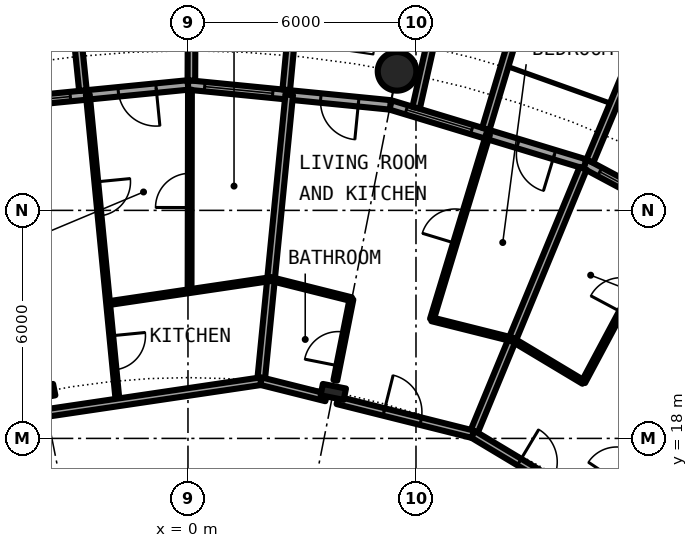
"""IFC4 building model, lengths in metres.
Left out: names, types, materials, properties, quantities, classifications, styles, units other than length and angle.
Written with IfcOpenShell. Run it as: python <this file> out.ifc"""

import sys

from ifc_helpers import new_model, si_unit, direction, frame, frame_2d, origin, origin_2d, place, context, subcontext, project, spatial, rectangle, hollow_circle, i_section, extrude, element, fill, save


model = new_model("IFC4")
c1 = context("Model", 3, precision=1e-05, world=origin(), true_north=direction((0.0, 1.0)))
c2 = subcontext(c1, "Body", "Model", "MODEL_VIEW")
j1 = project(units=[si_unit("LENGTHUNIT", "METRE"), si_unit("PLANEANGLEUNIT", "RADIAN")], contexts=[c1])
p1 = place(None, origin())
s1 = spatial("IfcSite", under=j1, at=p1, CompositionType="ELEMENT")
p2 = place(p1, origin())
s2 = spatial("IfcBuilding", under=s1, at=p2, CompositionType="ELEMENT")
p3 = place(p2, frame((0.0, 0.0, 31.95)))
s3 = spatial("IfcBuildingStorey", under=s2, at=p3, CompositionType="ELEMENT", Elevation=31.95)
p4 = place(p3, frame((5.501, 27.658, 0.0), z_axis=(0.0, 0.0, 1.0), x_axis=(1.0, 0.0, 0.0)))
e1 = element("IfcColumn", 1, at=p4, inside=s3, PredefinedType="COLUMN", context=c2, shape_type="SweptSolid", body=[
    extrude(hollow_circle(Radius=0.508, WallThickness=0.05, at=origin_2d()), origin(), (0.0, 0.0, 1.0), 3.05),
])
for number, where, z_axis, x_axis in (
    (2, (3.824, 19.223, 0.0), (0.0, 0.0, 1.0), (0.195, 0.981, 0.0)),
    (3, (-3.824, 19.223, 0.0), (0.0, 0.0, 1.0), (-0.195, 0.981, 0.0)),
):
    element("IfcColumn", number, at=place(p3, frame(where, z_axis=z_axis, x_axis=x_axis)), inside=s3, PredefinedType="COLUMN", context=c2, shape_type="SweptSolid", body=[
        extrude(i_section(OverallWidth=0.305, OverallDepth=0.62, WebThickness=0.021, FlangeThickness=0.04, FilletRadius=0.027, at=origin_2d()), origin(), (0.0, 0.0, 1.0), 3.05),
    ])
p5 = place(p3, frame((15.167, 22.699, 0.0), z_axis=(0.0, 0.0, 1.0), x_axis=(-0.881915646801, 0.471407246368, 0.0)))
e4 = element("IfcWall", 4, at=p5, inside=s3, PredefinedType="SOLIDWALL", context=c2, shape_type="SweptSolid", body=[
    extrude(rectangle(XDim=5.352, YDim=0.25, at=frame_2d((2.676, 0.0))), origin(), (0.0, 0.0, 1.0), 2.7),
])
p6 = place(p5, frame((0.841, 0.0, 0.0)))
e5 = element("IfcOpeningElement", 5, at=p6, cuts=e4, PredefinedType="OPENING", context=c2, shape_type="SweptSolid", body=[
    extrude(rectangle(XDim=1.0, YDim=2.2, at=frame_2d((0.5, 1.1))), frame((0.0, 0.135, 0.0), z_axis=(0.0, -1.0, 0.0), x_axis=(1.0, 0.0, 0.0)), (0.0, 0.0, 1.0), 0.27),
])
p7 = place(p5, frame((3.111, 0.0, 0.3)))
e6 = element("IfcOpeningElement", 6, at=p7, cuts=e4, PredefinedType="OPENING", context=c2, shape_type="SweptSolid", body=[
    extrude(rectangle(XDim=1.8, YDim=2.1, at=frame_2d((0.9, 1.05))), frame((0.0, 0.135, 0.0), z_axis=(0.0, -1.0, 0.0), x_axis=(1.0, 0.0, 0.0)), (0.0, 0.0, 1.0), 0.27),
])
p8 = place(p3, frame((10.575, 25.295, -0.03), z_axis=(0.0, 0.0, 1.0), x_axis=(0.385697364644, 0.922625353492, 0.0)))
e7 = element("IfcWall", 7, at=p8, inside=s3, PredefinedType="SOLIDWALL", context=c2, shape_type="SweptSolid", body=[
    extrude(rectangle(XDim=2.883, YDim=0.2, at=frame_2d((1.442, 0.0))), origin(), (0.0, 0.0, 1.0), 2.73),
])
p9 = place(p3, frame((10.447, 25.222, 0.0), z_axis=(0.0, 0.0, 1.0), x_axis=(-0.956965678721, 0.290201119486, 0.0)))
e8 = element("IfcWall", 8, at=p9, inside=s3, PredefinedType="SOLIDWALL", context=c2, shape_type="SweptSolid", body=[
    extrude(rectangle(XDim=5.351, YDim=0.25, at=frame_2d((2.676, 0.0))), origin(), (0.0, 0.0, 1.0), 2.7),
])
p10 = place(p9, frame((0.841, 0.0, 0.0)))
e9 = element("IfcOpeningElement", 9, at=p10, cuts=e8, PredefinedType="OPENING", context=c2, shape_type="SweptSolid", body=[
    extrude(rectangle(XDim=1.0, YDim=2.2, at=frame_2d((0.5, 1.1))), frame((0.0, 0.135, 0.0), z_axis=(0.0, -1.0, 0.0), x_axis=(1.0, 0.0, 0.0)), (0.0, 0.0, 1.0), 0.27),
])
p11 = place(p9, frame((3.111, 0.0, 0.3)))
e10 = element("IfcOpeningElement", 10, at=p11, cuts=e8, PredefinedType="OPENING", context=c2, shape_type="SweptSolid", body=[
    extrude(rectangle(XDim=1.8, YDim=2.1, at=frame_2d((0.9, 1.05))), frame((0.0, 0.135, 0.0), z_axis=(0.0, -1.0, 0.0), x_axis=(1.0, 0.0, 0.0)), (0.0, 0.0, 1.0), 0.27),
])
p12 = place(p3, frame((7.837, 26.144, -0.03), z_axis=(0.0, 0.0, 1.0), x_axis=(0.287064767992, 0.957911174889, 0.0)))
e11 = element("IfcWall", 11, at=p12, inside=s3, PredefinedType="SOLIDWALL", context=c2, shape_type="SweptSolid", body=[
    extrude(rectangle(XDim=3.006, YDim=0.2, at=frame_2d((1.503, 0.0))), origin(), (0.0, 0.0, 1.0), 2.73),
])
p13 = place(p3, frame((6.004, 26.7, -0.03), z_axis=(0.0, 0.0, 1.0), x_axis=(0.219609259383, 0.975587911566, 0.0)))
e12 = element("IfcWall", 12, at=p13, inside=s3, PredefinedType="SOLIDWALL", context=c2, shape_type="SweptSolid", body=[
    extrude(rectangle(XDim=2.933, YDim=0.2, at=frame_2d((1.466, 0.0))), origin(), (0.0, 0.0, 1.0), 2.73),
])
p14 = place(p3, frame((5.326, 26.775, 0.0), z_axis=(0.0, 0.0, 1.0), x_axis=(-0.995173996315, 0.098126026407, 0.0)))
e13 = element("IfcWall", 13, at=p14, inside=s3, PredefinedType="SOLIDWALL", context=c2, shape_type="SweptSolid", body=[
    extrude(rectangle(XDim=5.352, YDim=0.25, at=frame_2d((2.676, 0.0))), origin(), (0.0, 0.0, 1.0), 2.7),
])
p15 = place(p14, frame((0.841, 0.0, 0.0)))
e14 = element("IfcOpeningElement", 14, at=p15, cuts=e13, PredefinedType="OPENING", context=c2, shape_type="SweptSolid", body=[
    extrude(rectangle(XDim=1.0, YDim=2.2, at=frame_2d((0.5, 1.1))), frame((0.0, 0.135, 0.0), z_axis=(0.0, -1.0, 0.0), x_axis=(1.0, 0.0, 0.0)), (0.0, 0.0, 1.0), 0.27),
])
p16 = place(p14, frame((3.111, 0.0, 0.3)))
e15 = element("IfcOpeningElement", 15, at=p16, cuts=e13, PredefinedType="OPENING", context=c2, shape_type="SweptSolid", body=[
    extrude(rectangle(XDim=1.8, YDim=2.1, at=frame_2d((0.9, 1.05))), frame((0.0, 0.135, 0.0), z_axis=(0.0, -1.0, 0.0), x_axis=(1.0, 0.0, 0.0)), (0.0, 0.0, 1.0), 0.27),
])
p17 = place(p3, frame((2.586, 27.171, -0.03), z_axis=(0.0, 0.0, 1.0), x_axis=(0.094548432284, 0.995520262954, 0.0)))
e16 = element("IfcWall", 16, at=p17, inside=s3, PredefinedType="SOLIDWALL", context=c2, shape_type="SweptSolid", body=[
    extrude(rectangle(XDim=3.006, YDim=0.2, at=frame_2d((1.503, 0.0))), origin(), (0.0, 0.0, 1.0), 2.73),
])
p18 = place(p3, frame((0.09, 27.417, -0.03), z_axis=(0.0, 0.0, 1.0), x_axis=(0.00347308367, 0.999993968827, 0.0)))
e17 = element("IfcWall", 17, at=p18, inside=s3, PredefinedType="SOLIDWALL", context=c2, shape_type="SweptSolid", body=[
    extrude(rectangle(XDim=2.882, YDim=0.2, at=frame_2d((1.441, 0.0))), origin(), (0.0, 0.0, 1.0), 2.73),
])
p19 = place(p3, frame((0.0, 27.3, 0.0), z_axis=(0.0, 0.0, 1.0), x_axis=(-0.995173996315, -0.098126026407, 0.0)))
e18 = element("IfcWall", 18, at=p19, inside=s3, PredefinedType="SOLIDWALL", context=c2, shape_type="SweptSolid", body=[
    extrude(rectangle(XDim=5.352, YDim=0.25, at=frame_2d((2.676, 0.0))), origin(), (0.0, 0.0, 1.0), 2.7),
])
p20 = place(p19, frame((0.841, 0.0, 0.0)))
e19 = element("IfcOpeningElement", 19, at=p20, cuts=e18, PredefinedType="OPENING", context=c2, shape_type="SweptSolid", body=[
    extrude(rectangle(XDim=1.0, YDim=2.2, at=frame_2d((0.5, 1.1))), frame((0.0, 0.135, 0.0), z_axis=(0.0, -1.0, 0.0), x_axis=(1.0, 0.0, 0.0)), (0.0, 0.0, 1.0), 0.27),
])
p21 = place(p19, frame((3.111, 0.0, 0.3)))
e20 = element("IfcOpeningElement", 20, at=p21, cuts=e18, PredefinedType="OPENING", context=c2, shape_type="SweptSolid", body=[
    extrude(rectangle(XDim=1.8, YDim=2.1, at=frame_2d((0.9, 1.05))), frame((0.0, 0.135, 0.0), z_axis=(0.0, -1.0, 0.0), x_axis=(1.0, 0.0, 0.0)), (0.0, 0.0, 1.0), 0.27),
])
p22 = place(p3, frame((-2.764, 27.153, -0.03), z_axis=(0.0, 0.0, 1.0), x_axis=(-0.101505487237, 0.994834979311, 0.0)))
e21 = element("IfcWall", 21, at=p22, inside=s3, PredefinedType="SOLIDWALL", context=c2, shape_type="SweptSolid", body=[
    extrude(rectangle(XDim=3.007, YDim=0.2, at=frame_2d((1.503, 0.0))), origin(), (0.0, 0.0, 1.0), 2.73),
])
p23 = place(p3, frame((-2.636, 27.047, 0.0), z_axis=(0.0, 0.0, 1.0), x_axis=(0.096836141099, -0.995300337475, 0.0)))
e22 = element("IfcWall", 22, at=p23, inside=s3, PredefinedType="PARTITIONING", context=c2, shape_type="SweptSolid", body=[
    extrude(rectangle(XDim=8.138, YDim=0.1, at=frame_2d((4.069, 0.0))), origin(), (0.0, 0.0, 1.0), 2.7),
])
p24 = place(p23, frame((6.377, 0.0, 0.0)))
e23 = element("IfcOpeningElement", 23, at=p24, cuts=e22, PredefinedType="OPENING", context=c2, shape_type="SweptSolid", body=[
    extrude(rectangle(XDim=0.9, YDim=2.3, at=frame_2d((0.45, 1.15))), frame((0.0, 0.06, 0.0), z_axis=(0.0, -1.0, 0.0), x_axis=(1.0, 0.0, 0.0)), (0.0, 0.0, 1.0), 0.12),
])
p25 = place(p23, frame((2.308, 0.0, 0.0)))
e24 = element("IfcOpeningElement", 24, at=p25, cuts=e22, PredefinedType="OPENING", context=c2, shape_type="SweptSolid", body=[
    extrude(rectangle(XDim=0.9, YDim=2.3, at=frame_2d((0.45, 1.15))), frame((0.0, 0.06, 0.0), z_axis=(0.0, -1.0, 0.0), x_axis=(1.0, 0.0, 0.0)), (0.0, 0.0, 1.0), 0.12),
])
p26 = place(p3, frame((0.042, 21.875, 0.0), z_axis=(0.0, 0.0, 1.0), x_axis=(0.001888614256, 0.999998216567, 0.0)))
e25 = element("IfcWall", 25, at=p26, inside=s3, PredefinedType="PARTITIONING", context=c2, shape_type="SweptSolid", body=[
    extrude(rectangle(XDim=5.3, YDim=0.1, at=frame_2d((2.65, 0.0))), origin(), (0.0, 0.0, 1.0), 2.7),
])
p27 = place(p26, frame((2.2, 0.0, 0.0)))
e26 = element("IfcOpeningElement", 26, at=p27, cuts=e25, PredefinedType="OPENING", context=c2, shape_type="SweptSolid", body=[
    extrude(rectangle(XDim=0.9, YDim=2.3, at=frame_2d((0.45, 1.15))), frame((0.0, 0.06, 0.0), z_axis=(0.0, -1.0, 0.0), x_axis=(1.0, 0.0, 0.0)), (0.0, 0.0, 1.0), 0.12),
])
p28 = place(p3, frame((1.921, 19.506, 0.0), z_axis=(0.0, 0.0, 1.0), x_axis=(0.098115395479, 0.995175044487, 0.0)))
e27 = element("IfcWall", 27, at=p28, inside=s3, PredefinedType="PARTITIONING", context=c2, shape_type="SweptSolid", body=[
    extrude(rectangle(XDim=7.574, YDim=0.2, at=frame_2d((3.787, 0.0))), origin(), (0.0, 0.0, 1.0), 2.7),
])
p29 = place(p3, frame((3.878, 19.529, 0.0), z_axis=(0.0, 0.0, 1.0), x_axis=(0.194907578226, 0.980821612706, 0.0)))
e28 = element("IfcWall", 28, at=p29, inside=s3, PredefinedType="PARTITIONING", context=c2, shape_type="SweptSolid", body=[
    extrude(rectangle(XDim=2.176, YDim=0.1, at=frame_2d((1.088, 0.0))), origin(), (0.0, 0.0, 1.0), 2.7),
])
p30 = place(p29, frame((0.389, 0.0, 0.0)))
e29 = element("IfcOpeningElement", 29, at=p30, cuts=e28, PredefinedType="OPENING", context=c2, shape_type="SweptSolid", body=[
    extrude(rectangle(XDim=0.9, YDim=2.3, at=frame_2d((0.45, 1.15))), frame((0.0, 0.06, 0.0), z_axis=(0.0, -1.0, 0.0), x_axis=(1.0, 0.0, 0.0)), (0.0, 0.0, 1.0), 0.12),
])
p31 = place(p3, frame((6.418, 21.133, 0.0), z_axis=(0.0, 0.0, 1.0), x_axis=(0.290651827018, 0.956828885147, 0.0)))
e30 = element("IfcWall", 30, at=p31, inside=s3, PredefinedType="PARTITIONING", context=c2, shape_type="SweptSolid", body=[
    extrude(rectangle(XDim=5.089, YDim=0.1, at=frame_2d((2.544, 0.0))), origin(), (0.0, 0.0, 1.0), 2.7),
])
p32 = place(p31, frame((2.094, 0.0, 0.0)))
e31 = element("IfcOpeningElement", 31, at=p32, cuts=e30, PredefinedType="OPENING", context=c2, shape_type="SweptSolid", body=[
    extrude(rectangle(XDim=0.9, YDim=2.3, at=frame_2d((0.45, 1.15))), frame((0.0, 0.06, 0.0), z_axis=(0.0, -1.0, 0.0), x_axis=(1.0, 0.0, 0.0)), (0.0, 0.0, 1.0), 0.12),
])
p33 = place(p3, frame((7.501, 18.108, 0.0), z_axis=(0.0, 0.0, 1.0), x_axis=(0.382490346157, 0.923959487801, 0.0)))
e32 = element("IfcWall", 32, at=p33, inside=s3, PredefinedType="PARTITIONING", context=c2, shape_type="SweptSolid", body=[
    extrude(rectangle(XDim=7.574, YDim=0.2, at=frame_2d((3.787, 0.0))), origin(), (0.0, 0.0, 1.0), 2.7),
])
p34 = place(p3, frame((10.405, 19.481, 0.0), z_axis=(0.0, 0.0, 1.0), x_axis=(0.471170755767, 0.882042016522, 0.0)))
e33 = element("IfcWall", 33, at=p34, inside=s3, PredefinedType="PARTITIONING", context=c2, shape_type="SweptSolid", body=[
    extrude(rectangle(XDim=5.089, YDim=0.1, at=frame_2d((2.545, 0.0))), origin(), (0.0, 0.0, 1.0), 2.7),
])
p35 = place(p34, frame((2.095, 0.0, 0.0)))
e34 = element("IfcOpeningElement", 34, at=p35, cuts=e33, PredefinedType="OPENING", context=c2, shape_type="SweptSolid", body=[
    extrude(rectangle(XDim=0.9, YDim=2.3, at=frame_2d((0.45, 1.15))), frame((0.0, 0.06, 0.0), z_axis=(0.0, -1.0, 0.0), x_axis=(1.0, 0.0, 0.0)), (0.0, 0.0, 1.0), 0.12),
])
p36 = place(p3, frame((11.067, 16.551, 0.0), z_axis=(0.0, 0.0, 1.0), x_axis=(0.55563200073, 0.831428337119, 0.0)))
e35 = element("IfcWall", 35, at=p36, inside=s3, PredefinedType="PARTITIONING", context=c2, shape_type="SweptSolid", body=[
    extrude(rectangle(XDim=2.176, YDim=0.1, at=frame_2d((1.088, 0.0))), origin(), (0.0, 0.0, 1.0), 2.7),
])
p37 = place(p36, frame((0.389, 0.0, 0.0)))
e36 = element("IfcOpeningElement", 36, at=p37, cuts=e35, PredefinedType="OPENING", context=c2, shape_type="SweptSolid", body=[
    extrude(rectangle(XDim=0.9, YDim=2.3, at=frame_2d((0.45, 1.15))), frame((0.0, 0.06, 0.0), z_axis=(0.0, -1.0, 0.0), x_axis=(1.0, 0.0, 0.0)), (0.0, 0.0, 1.0), 0.12),
])
p38 = place(p3, frame((-7.501, 18.108, 0.0), z_axis=(0.0, 0.0, 1.0), x_axis=(0.989167514259, 0.146791105777, 0.0)))
e37 = element("IfcWall", 37, at=p38, inside=s3, PredefinedType="PARTITIONING", context=c2, shape_type="SweptSolid", body=[
    extrude(rectangle(XDim=9.525, YDim=0.2, at=frame_2d((4.763, 0.0))), origin(), (0.0, 0.0, 1.0), 2.38),
])
p39 = place(p38, frame((2.355, 0.0, 0.0)))
e38 = element("IfcOpeningElement", 38, at=p39, cuts=e37, PredefinedType="OPENING", context=c2, shape_type="SweptSolid", body=[
    extrude(rectangle(XDim=1.0, YDim=2.3, at=frame_2d((0.5, 1.15))), frame((0.0, 0.11, 0.0), z_axis=(0.0, -1.0, 0.0), x_axis=(1.0, 0.0, 0.0)), (0.0, 0.0, 1.0), 0.22),
])
p40 = place(p3, frame((1.921, 19.506, 0.0), z_axis=(0.0, 0.0, 1.0), x_axis=(0.970053237222, -0.242892397895, 0.0)))
e39 = element("IfcWall", 39, at=p40, inside=s3, PredefinedType="PARTITIONING", context=c2, shape_type="SweptSolid", body=[
    extrude(rectangle(XDim=1.771, YDim=0.2, at=frame_2d((0.885, 0.0))), origin(), (0.0, 0.0, 1.0), 2.38),
])
p41 = place(p3, frame((3.935, 19.001, 0.0), z_axis=(0.0, 0.0, 1.0), x_axis=(0.970040840928, -0.242941900323, 0.0)))
e40 = element("IfcWall", 40, at=p41, inside=s3, PredefinedType="PARTITIONING", context=c2, shape_type="SweptSolid", body=[
    extrude(rectangle(XDim=3.676, YDim=0.2, at=frame_2d((1.838, 0.0))), origin(), (0.0, 0.0, 1.0), 2.38),
])
p42 = place(p41, frame((1.259, 0.0, 0.0)))
e41 = element("IfcOpeningElement", 41, at=p42, cuts=e40, PredefinedType="OPENING", context=c2, shape_type="SweptSolid", body=[
    extrude(rectangle(XDim=1.0, YDim=2.3, at=frame_2d((0.5, 1.15))), frame((0.0, 0.11, 0.0), z_axis=(0.0, -1.0, 0.0), x_axis=(1.0, 0.0, 0.0)), (0.0, 0.0, 1.0), 0.22),
])
p43 = place(p3, frame((7.501, 18.108, 0.0), z_axis=(0.0, 0.0, 1.0), x_axis=(0.857656999296, -0.514222200569, 0.0)))
e42 = element("IfcWall", 42, at=p43, inside=s3, PredefinedType="PARTITIONING", context=c2, shape_type="SweptSolid", body=[
    extrude(rectangle(XDim=3.675, YDim=0.2, at=frame_2d((1.838, 0.0))), origin(), (0.0, 0.0, 1.0), 2.38),
])
p44 = place(p43, frame((1.418, 0.0, 0.0)))
e43 = element("IfcOpeningElement", 43, at=p44, cuts=e42, PredefinedType="OPENING", context=c2, shape_type="SweptSolid", body=[
    extrude(rectangle(XDim=1.0, YDim=2.3, at=frame_2d((0.5, 1.15))), frame((0.0, 0.11, 0.0), z_axis=(0.0, -1.0, 0.0), x_axis=(1.0, 0.0, 0.0)), (0.0, 0.0, 1.0), 0.22),
])
p45 = place(p3, frame((-2.102, 21.557, 0.0), z_axis=(0.0, 0.0, 1.0), x_axis=(0.989171386505, 0.146765009863, 0.0)))
e44 = element("IfcWall", 44, at=p45, inside=s3, PredefinedType="PARTITIONING", context=c2, shape_type="SweptSolid", body=[
    extrude(rectangle(XDim=4.335, YDim=0.1, at=frame_2d((2.167, 0.0))), origin(), (0.0, 0.0, 1.0), 2.7),
])
for number, where, z_axis, x_axis in (
    (45, (2.186, 22.193, 0.0), (0.0, 0.0, 1.0), (0.97, -0.243, 0.0)),
    (46, (6.418, 21.133, 0.0), (0.0, 0.0, 1.0), (0.97, -0.243, 0.0)),
):
    element("IfcWall", number, at=place(p3, frame(where, z_axis=z_axis, x_axis=x_axis)), inside=s3, PredefinedType="PARTITIONING", context=c2, shape_type="SweptSolid", body=[
        extrude(rectangle(XDim=2.181, YDim=0.1, at=frame_2d((1.091, 0.0))), origin(), (0.0, 0.0, 1.0), 2.7),
    ])
p46 = place(p3, frame((8.534, 20.603, 0.0), z_axis=(0.0, 0.0, 1.0), x_axis=(0.857611386679, -0.514298268943, 0.0)))
e47 = element("IfcWall", 47, at=p46, inside=s3, PredefinedType="PARTITIONING", context=c2, shape_type="SweptSolid", body=[
    extrude(rectangle(XDim=2.182, YDim=0.1, at=frame_2d((1.091, 0.0))), origin(), (0.0, 0.0, 1.0), 2.7),
])
p47 = place(p7, origin())
e48 = element("IfcWindow", 48, at=p47, inside=s3, PartitioningType="SINGLE_PANEL", PredefinedType="WINDOW", context=c2, shape_type="SweptSolid", body=[
    extrude(rectangle(XDim=1.8, YDim=2.1, at=frame_2d((0.9, 1.05))), frame((0.0, 0.03, 0.0), z_axis=(0.0, -1.0, 0.0), x_axis=(1.0, 0.0, 0.0)), (0.0, 0.0, 1.0), 0.06),
])
fill(e6, e48)
p48 = place(p10, origin())
e49 = element("IfcDoor", 49, at=p48, inside=s3, OperationType="SINGLE_SWING_LEFT", PredefinedType="DOOR", context=c2, shape_type="SweptSolid", body=[
    extrude(rectangle(XDim=1.0, YDim=2.2, at=frame_2d((0.5, 1.1))), frame((0.0, 0.025, 0.0), z_axis=(0.0, -1.0, 0.0), x_axis=(1.0, 0.0, 0.0)), (0.0, 0.0, 1.0), 0.05),
])
fill(e9, e49)
p49 = place(p11, origin())
e50 = element("IfcWindow", 50, at=p49, inside=s3, PartitioningType="SINGLE_PANEL", PredefinedType="WINDOW", context=c2, shape_type="SweptSolid", body=[
    extrude(rectangle(XDim=1.8, YDim=2.1, at=frame_2d((0.9, 1.05))), frame((0.0, 0.03, 0.0), z_axis=(0.0, -1.0, 0.0), x_axis=(1.0, 0.0, 0.0)), (0.0, 0.0, 1.0), 0.06),
])
fill(e10, e50)
p50 = place(p15, origin())
e51 = element("IfcDoor", 51, at=p50, inside=s3, OperationType="SINGLE_SWING_LEFT", PredefinedType="DOOR", context=c2, shape_type="SweptSolid", body=[
    extrude(rectangle(XDim=1.0, YDim=2.2, at=frame_2d((0.5, 1.1))), frame((0.0, 0.025, 0.0), z_axis=(0.0, -1.0, 0.0), x_axis=(1.0, 0.0, 0.0)), (0.0, 0.0, 1.0), 0.05),
])
fill(e14, e51)
p51 = place(p16, origin())
e52 = element("IfcWindow", 52, at=p51, inside=s3, PartitioningType="SINGLE_PANEL", PredefinedType="WINDOW", context=c2, shape_type="SweptSolid", body=[
    extrude(rectangle(XDim=1.8, YDim=2.1, at=frame_2d((0.9, 1.05))), frame((0.0, 0.03, 0.0), z_axis=(0.0, -1.0, 0.0), x_axis=(1.0, 0.0, 0.0)), (0.0, 0.0, 1.0), 0.06),
])
fill(e15, e52)
p52 = place(p20, origin())
e53 = element("IfcDoor", 53, at=p52, inside=s3, OperationType="SINGLE_SWING_LEFT", PredefinedType="DOOR", context=c2, shape_type="SweptSolid", body=[
    extrude(rectangle(XDim=1.0, YDim=2.2, at=frame_2d((0.5, 1.1))), frame((0.0, 0.025, 0.0), z_axis=(0.0, -1.0, 0.0), x_axis=(1.0, 0.0, 0.0)), (0.0, 0.0, 1.0), 0.05),
])
fill(e19, e53)
p53 = place(p21, origin())
e54 = element("IfcWindow", 54, at=p53, inside=s3, PartitioningType="SINGLE_PANEL", PredefinedType="WINDOW", context=c2, shape_type="SweptSolid", body=[
    extrude(rectangle(XDim=1.8, YDim=2.1, at=frame_2d((0.9, 1.05))), frame((0.0, 0.03, 0.0), z_axis=(0.0, -1.0, 0.0), x_axis=(1.0, 0.0, 0.0)), (0.0, 0.0, 1.0), 0.06),
])
fill(e20, e54)
p54 = place(p44, origin())
e55 = element("IfcDoor", 55, at=p54, inside=s3, OperationType="SINGLE_SWING_RIGHT", PredefinedType="DOOR", context=c2, shape_type="SweptSolid", body=[
    extrude(rectangle(XDim=1.0, YDim=2.3, at=frame_2d((0.5, 1.15))), frame((0.0, 0.025, 0.0), z_axis=(0.0, -1.0, 0.0), x_axis=(1.0, 0.0, 0.0)), (0.0, 0.0, 1.0), 0.05),
])
fill(e43, e55)
p55 = place(p37, origin())
e56 = element("IfcDoor", 56, at=p55, inside=s3, OperationType="SINGLE_SWING_LEFT", PredefinedType="DOOR", context=c2, shape_type="SweptSolid", body=[
    extrude(rectangle(XDim=0.9, YDim=2.3, at=frame_2d((0.45, 1.15))), frame((0.0, 0.025, 0.0), z_axis=(0.0, -1.0, 0.0), x_axis=(1.0, 0.0, 0.0)), (0.0, 0.0, 1.0), 0.05),
])
fill(e36, e56)
p56 = place(p42, origin())
e57 = element("IfcDoor", 57, at=p56, inside=s3, OperationType="SINGLE_SWING_LEFT", PredefinedType="DOOR", context=c2, shape_type="SweptSolid", body=[
    extrude(rectangle(XDim=1.0, YDim=2.3, at=frame_2d((0.5, 1.15))), frame((0.0, 0.025, 0.0), z_axis=(0.0, -1.0, 0.0), x_axis=(1.0, 0.0, 0.0)), (0.0, 0.0, 1.0), 0.05),
])
fill(e41, e57)
p57 = place(p30, origin())
e58 = element("IfcDoor", 58, at=p57, inside=s3, OperationType="SINGLE_SWING_LEFT", PredefinedType="DOOR", context=c2, shape_type="SweptSolid", body=[
    extrude(rectangle(XDim=0.9, YDim=2.3, at=frame_2d((0.45, 1.15))), frame((0.0, 0.025, 0.0), z_axis=(0.0, -1.0, 0.0), x_axis=(1.0, 0.0, 0.0)), (0.0, 0.0, 1.0), 0.05),
])
fill(e29, e58)
p58 = place(p32, origin())
e59 = element("IfcDoor", 59, at=p58, inside=s3, OperationType="SINGLE_SWING_LEFT", PredefinedType="DOOR", context=c2, shape_type="SweptSolid", body=[
    extrude(rectangle(XDim=0.9, YDim=2.3, at=frame_2d((0.45, 1.15))), frame((0.0, 0.025, 0.0), z_axis=(0.0, -1.0, 0.0), x_axis=(1.0, 0.0, 0.0)), (0.0, 0.0, 1.0), 0.05),
])
fill(e31, e59)
p59 = place(p24, origin())
e60 = element("IfcDoor", 60, at=p59, inside=s3, OperationType="SINGLE_SWING_RIGHT", PredefinedType="DOOR", context=c2, shape_type="SweptSolid", body=[
    extrude(rectangle(XDim=0.9, YDim=2.3, at=frame_2d((0.45, 1.15))), frame((0.0, 0.025, 0.0), z_axis=(0.0, -1.0, 0.0), x_axis=(1.0, 0.0, 0.0)), (0.0, 0.0, 1.0), 0.05),
])
fill(e23, e60)
p60 = place(p25, origin())
e61 = element("IfcDoor", 61, at=p60, inside=s3, OperationType="SINGLE_SWING_LEFT", PredefinedType="DOOR", context=c2, shape_type="SweptSolid", body=[
    extrude(rectangle(XDim=0.9, YDim=2.3, at=frame_2d((0.45, 1.15))), frame((0.0, 0.025, 0.0), z_axis=(0.0, -1.0, 0.0), x_axis=(1.0, 0.0, 0.0)), (0.0, 0.0, 1.0), 0.05),
])
fill(e24, e61)
p61 = place(p27, origin())
e62 = element("IfcDoor", 62, at=p61, inside=s3, OperationType="SINGLE_SWING_RIGHT", PredefinedType="DOOR", context=c2, shape_type="SweptSolid", body=[
    extrude(rectangle(XDim=0.9, YDim=2.3, at=frame_2d((0.45, 1.15))), frame((0.0, 0.025, 0.0), z_axis=(0.0, -1.0, 0.0), x_axis=(1.0, 0.0, 0.0)), (0.0, 0.0, 1.0), 0.05),
])
fill(e26, e62)
save(model, sys.argv[1])
